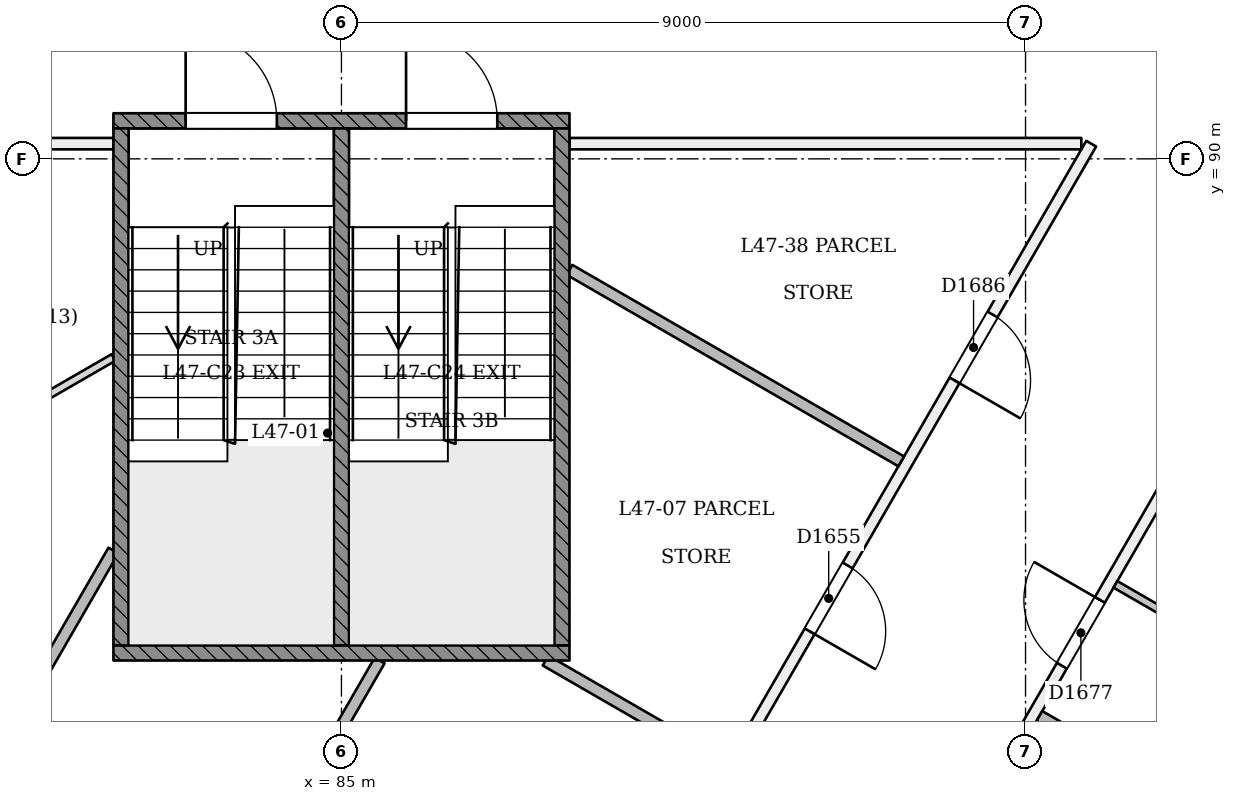
"""IFC4 building model, lengths in metres.
Left out: names, types, materials, properties, quantities, classifications, styles, units other than length and angle.
Written with IfcOpenShell. Run it as: python <this file> out.ifc"""

import sys

from ifc_helpers import new_model, si_unit, direction, frame, frame_2d, origin, place, context, subcontext, project, spatial, rectangle, extrude, element, fill, save


model = new_model("IFC4")
c1 = context("Model", 3, precision=1e-05, world=origin(), true_north=direction((0.0, 1.0)))
c2 = subcontext(c1, "Body", "Model", "MODEL_VIEW")
j1 = project(units=[si_unit("LENGTHUNIT", "METRE"), si_unit("PLANEANGLEUNIT", "RADIAN")], contexts=[c1])
p1 = place(None, origin())
s1 = spatial("IfcSite", under=j1, at=p1, CompositionType="ELEMENT")
p2 = place(p1, origin())
s2 = spatial("IfcBuilding", under=s1, at=p2, CompositionType="ELEMENT")
p3 = place(p2, frame((0.0, 0.0, 181.8)))
s3 = spatial("IfcBuildingStorey", under=s2, at=p3, CompositionType="ELEMENT", Elevation=181.8)
p4 = place(p3, frame((85.0, 73.115, 0.0), z_axis=(0.0, 0.0, 1.0), x_axis=(-0.500000261386, 0.866025252873, 0.0)))
e1 = element("IfcWall", 1, at=p4, inside=s3, PredefinedType="PARTITIONING", context=c2, shape_type="SweptSolid", body=[
    extrude(rectangle(XDim=19.728, YDim=0.15, at=frame_2d((9.864, 0.0))), origin(), (0.0, 0.0, 1.0), 3.15),
])
p5 = place(p4, frame((16.362, 0.0, 0.0)))
e2 = element("IfcOpeningElement", 2, at=p5, cuts=e1, PredefinedType="OPENING", context=c2, shape_type="SweptSolid", body=[
    extrude(rectangle(XDim=0.9, YDim=2.1, at=frame_2d((0.45, 1.05))), frame((0.0, 0.085, 0.0), z_axis=(0.0, -1.0, 0.0), x_axis=(1.0, 0.0, 0.0)), (0.0, 0.0, 1.0), 0.171),
])
p6 = place(p4, frame((11.847, 0.0, 0.0)))
e3 = element("IfcOpeningElement", 3, at=p6, cuts=e1, PredefinedType="OPENING", context=c2, shape_type="SweptSolid", body=[
    extrude(rectangle(XDim=1.0, YDim=2.1, at=frame_2d((0.5, 1.05))), frame((0.0, 0.085, 0.0), z_axis=(0.0, -1.0, 0.0), x_axis=(1.0, 0.0, 0.0)), (0.0, 0.0, 1.0), 0.171),
])
p7 = place(p4, frame((2.715, 0.0, 0.0)))
e4 = element("IfcOpeningElement", 4, at=p7, cuts=e1, PredefinedType="OPENING", context=c2, shape_type="SweptSolid", body=[
    extrude(rectangle(XDim=1.0, YDim=2.1, at=frame_2d((0.5, 1.05))), frame((0.0, 0.085, 0.0), z_axis=(0.0, -1.0, 0.0), x_axis=(1.0, 0.0, 0.0)), (0.0, 0.0, 1.0), 0.171),
])
p8 = place(p4, frame((7.991, 0.0, 0.0)))
e5 = element("IfcOpeningElement", 5, at=p8, cuts=e1, PredefinedType="OPENING", context=c2, shape_type="SweptSolid", body=[
    extrude(rectangle(XDim=1.0, YDim=2.1, at=frame_2d((0.5, 1.05))), frame((0.0, 0.085, 0.0), z_axis=(0.0, -1.0, 0.0), x_axis=(1.0, 0.0, 0.0)), (0.0, 0.0, 1.0), 0.171),
])
p9 = place(p3, frame((75.266, 90.2, 0.0), z_axis=(0.0, 0.0, 1.0), x_axis=(1.0, 0.0, 0.0)))
e6 = element("IfcWall", 6, at=p9, inside=s3, PredefinedType="PARTITIONING", context=c2, shape_type="SweptSolid", body=[
    extrude(rectangle(XDim=6.734, YDim=0.15, at=frame_2d((3.367, 0.0))), origin(), (0.0, 0.0, 1.0), 3.15),
])
p10 = place(p9, frame((4.62, 0.0, 0.0)))
e7 = element("IfcOpeningElement", 7, at=p10, cuts=e6, PredefinedType="OPENING", context=c2, shape_type="SweptSolid", body=[
    extrude(rectangle(XDim=0.9, YDim=2.1, at=frame_2d((0.45, 1.05))), frame((0.0, 0.085, 0.0), z_axis=(0.0, -1.0, 0.0), x_axis=(1.0, 0.0, 0.0)), (0.0, 0.0, 1.0), 0.171),
])
p11 = place(p3, frame((71.556, 90.2, 0.0), z_axis=(0.0, 0.0, 1.0), x_axis=(0.499999195485, -0.866025868271, 0.0)))
e8 = element("IfcWall", 8, at=p11, inside=s3, PredefinedType="PARTITIONING", context=c2, shape_type="SweptSolid", body=[
    extrude(rectangle(XDim=26.651, YDim=0.15, at=frame_2d((13.326, 0.0))), origin(), (0.0, 0.0, 1.0), 2.75),
])
p12 = place(p11, frame((0.381, 0.0, 0.0)))
e9 = element("IfcOpeningElement", 9, at=p12, cuts=e8, PredefinedType="OPENING", context=c2, shape_type="SweptSolid", body=[
    extrude(rectangle(XDim=1.0, YDim=2.1, at=frame_2d((0.5, 1.05))), frame((0.0, 0.085, 0.0), z_axis=(0.0, -1.0, 0.0), x_axis=(1.0, 0.0, 0.0)), (0.0, 0.0, 1.0), 0.171),
])
p13 = place(p11, frame((7.047, 0.0, 0.0)))
e10 = element("IfcOpeningElement", 10, at=p13, cuts=e8, PredefinedType="OPENING", context=c2, shape_type="SweptSolid", body=[
    extrude(rectangle(XDim=1.0, YDim=2.1, at=frame_2d((0.5, 1.05))), frame((0.0, 0.085, 0.0), z_axis=(0.0, -1.0, 0.0), x_axis=(1.0, 0.0, 0.0)), (0.0, 0.0, 1.0), 0.171),
])
p14 = place(p11, frame((10.402, 0.0, 0.0)))
e11 = element("IfcOpeningElement", 11, at=p14, cuts=e8, PredefinedType="OPENING", context=c2, shape_type="SweptSolid", body=[
    extrude(rectangle(XDim=1.0, YDim=2.1, at=frame_2d((0.5, 1.05))), frame((0.0, 0.085, 0.0), z_axis=(0.0, -1.0, 0.0), x_axis=(1.0, 0.0, 0.0)), (0.0, 0.0, 1.0), 0.171),
])
p15 = place(p11, frame((14.902, 0.0, 0.0)))
e12 = element("IfcOpeningElement", 12, at=p15, cuts=e8, PredefinedType="OPENING", context=c2, shape_type="SweptSolid", body=[
    extrude(rectangle(XDim=1.0, YDim=2.1, at=frame_2d((0.5, 1.05))), frame((0.0, 0.085, 0.0), z_axis=(0.0, -1.0, 0.0), x_axis=(1.0, 0.0, 0.0)), (0.0, 0.0, 1.0), 0.171),
])
p16 = place(p11, frame((18.372, 0.0, 0.0)))
e13 = element("IfcOpeningElement", 13, at=p16, cuts=e8, PredefinedType="OPENING", context=c2, shape_type="SweptSolid", body=[
    extrude(rectangle(XDim=1.0, YDim=2.1, at=frame_2d((0.5, 1.05))), frame((0.0, 0.085, 0.0), z_axis=(0.0, -1.0, 0.0), x_axis=(1.0, 0.0, 0.0)), (0.0, 0.0, 1.0), 0.171),
])
p17 = place(p11, frame((24.933, 0.0, 0.0)))
e14 = element("IfcOpeningElement", 14, at=p17, cuts=e8, PredefinedType="OPENING", context=c2, shape_type="SweptSolid", body=[
    extrude(rectangle(XDim=1.0, YDim=2.1, at=frame_2d((0.5, 1.05))), frame((0.0, 0.085, 0.0), z_axis=(0.0, -1.0, 0.0), x_axis=(1.0, 0.0, 0.0)), (0.0, 0.0, 1.0), 0.171),
])
p18 = place(p3, frame((85.033, 66.972, 0.0), z_axis=(0.0, 0.0, 1.0), x_axis=(0.500001115073, 0.866024759996, 0.0)))
e15 = element("IfcWall", 15, at=p18, inside=s3, PredefinedType="PARTITIONING", context=c2, shape_type="SweptSolid", body=[
    extrude(rectangle(XDim=26.822, YDim=0.15, at=frame_2d((13.411, 0.0))), origin(), (0.0, 0.0, 1.0), 2.75),
])
p19 = place(p18, frame((0.527, 0.0, 0.0)))
e16 = element("IfcOpeningElement", 16, at=p19, cuts=e15, PredefinedType="OPENING", context=c2, shape_type="SweptSolid", body=[
    extrude(rectangle(XDim=1.2, YDim=2.1, at=frame_2d((0.6, 1.05))), frame((0.0, 0.085, 0.0), z_axis=(0.0, -1.0, 0.0), x_axis=(1.0, 0.0, 0.0)), (0.0, 0.0, 1.0), 0.171),
])
p20 = place(p18, frame((7.566, 0.0, 0.0)))
e17 = element("IfcOpeningElement", 17, at=p20, cuts=e15, PredefinedType="OPENING", context=c2, shape_type="SweptSolid", body=[
    extrude(rectangle(XDim=1.0, YDim=2.1, at=frame_2d((0.5, 1.05))), frame((0.0, 0.085, 0.0), z_axis=(0.0, -1.0, 0.0), x_axis=(1.0, 0.0, 0.0)), (0.0, 0.0, 1.0), 0.171),
])
p21 = place(p18, frame((9.891, 0.0, 0.0)))
e18 = element("IfcOpeningElement", 18, at=p21, cuts=e15, PredefinedType="OPENING", context=c2, shape_type="SweptSolid", body=[
    extrude(rectangle(XDim=1.0, YDim=2.1, at=frame_2d((0.5, 1.05))), frame((0.0, 0.085, 0.0), z_axis=(0.0, -1.0, 0.0), x_axis=(1.0, 0.0, 0.0)), (0.0, 0.0, 1.0), 0.171),
])
p22 = place(p18, frame((16.45, 0.0, 0.0)))
e19 = element("IfcOpeningElement", 19, at=p22, cuts=e15, PredefinedType="OPENING", context=c2, shape_type="SweptSolid", body=[
    extrude(rectangle(XDim=1.0, YDim=2.1, at=frame_2d((0.5, 1.05))), frame((0.0, 0.085, 0.0), z_axis=(0.0, -1.0, 0.0), x_axis=(1.0, 0.0, 0.0)), (0.0, 0.0, 1.0), 0.171),
])
p23 = place(p18, frame((18.891, 0.0, 0.0)))
e20 = element("IfcOpeningElement", 20, at=p23, cuts=e15, PredefinedType="OPENING", context=c2, shape_type="SweptSolid", body=[
    extrude(rectangle(XDim=1.0, YDim=2.1, at=frame_2d((0.5, 1.05))), frame((0.0, 0.085, 0.0), z_axis=(0.0, -1.0, 0.0), x_axis=(1.0, 0.0, 0.0)), (0.0, 0.0, 1.0), 0.171),
])
p24 = place(p18, frame((24.413, 0.0, 0.0)))
e21 = element("IfcOpeningElement", 21, at=p24, cuts=e15, PredefinedType="OPENING", context=c2, shape_type="SweptSolid", body=[
    extrude(rectangle(XDim=1.0, YDim=2.1, at=frame_2d((0.5, 1.05))), frame((0.0, 0.085, 0.0), z_axis=(0.0, -1.0, 0.0), x_axis=(1.0, 0.0, 0.0)), (0.0, 0.0, 1.0), 0.171),
])
p25 = place(p3, frame((94.864, 90.2, 0.0), z_axis=(0.0, 0.0, 1.0), x_axis=(-0.500001743747, -0.866024397029, 0.0)))
e22 = element("IfcWall", 22, at=p25, inside=s3, PredefinedType="PARTITIONING", context=c2, shape_type="SweptSolid", body=[
    extrude(rectangle(XDim=19.598, YDim=0.15, at=frame_2d((9.799, 0.0))), origin(), (0.0, 0.0, 1.0), 3.15),
])
p26 = place(p25, frame((6.408, 0.0, 0.0)))
e23 = element("IfcOpeningElement", 23, at=p26, cuts=e22, PredefinedType="OPENING", context=c2, shape_type="SweptSolid", body=[
    extrude(rectangle(XDim=1.0, YDim=2.1, at=frame_2d((0.5, 1.05))), frame((0.0, 0.085, 0.0), z_axis=(0.0, -1.0, 0.0), x_axis=(1.0, 0.0, 0.0)), (0.0, 0.0, 1.0), 0.171),
])
p27 = place(p25, frame((11.875, 0.0, 0.0)))
e24 = element("IfcOpeningElement", 24, at=p27, cuts=e22, PredefinedType="OPENING", context=c2, shape_type="SweptSolid", body=[
    extrude(rectangle(XDim=1.0, YDim=2.1, at=frame_2d((0.5, 1.05))), frame((0.0, 0.085, 0.0), z_axis=(0.0, -1.0, 0.0), x_axis=(1.0, 0.0, 0.0)), (0.0, 0.0, 1.0), 0.171),
])
p28 = place(p25, frame((2.596, 0.0, 0.0)))
e25 = element("IfcOpeningElement", 25, at=p28, cuts=e22, PredefinedType="OPENING", context=c2, shape_type="SweptSolid", body=[
    extrude(rectangle(XDim=1.0, YDim=2.1, at=frame_2d((0.5, 1.05))), frame((0.0, 0.085, 0.0), z_axis=(0.0, -1.0, 0.0), x_axis=(1.0, 0.0, 0.0)), (0.0, 0.0, 1.0), 0.171),
])
p29 = place(p3, frame((88.0, 90.2, 0.0), z_axis=(0.0, 0.0, 1.0), x_axis=(1.0, 0.0, 0.0)))
e26 = element("IfcWall", 26, at=p29, inside=s3, PredefinedType="PARTITIONING", context=c2, shape_type="SweptSolid", body=[
    extrude(rectangle(XDim=6.734, YDim=0.15, at=frame_2d((3.367, 0.0))), origin(), (0.0, 0.0, 1.0), 3.15),
])
p30 = place(p3, frame((78.135, 85.155, 0.0), z_axis=(0.0, 0.0, 1.0), x_axis=(0.866036176647, 0.49998134039, 0.0)))
e27 = element("IfcWall", 27, at=p30, inside=s3, PredefinedType="PARTITIONING", context=c2, shape_type="SweptSolid", body=[
    extrude(rectangle(XDim=4.463, YDim=0.1, at=frame_2d((2.231, 0.0))), origin(), (0.0, 0.0, 1.0), 3.15),
])
p31 = place(p3, frame((80.178, 81.692, 0.0), z_axis=(0.0, 0.0, 1.0), x_axis=(0.500037576254, 0.866003708037, 0.0)))
e28 = element("IfcWall", 28, at=p31, inside=s3, PredefinedType="PARTITIONING", context=c2, shape_type="SweptSolid", body=[
    extrude(rectangle(XDim=3.644, YDim=0.15, at=frame_2d((1.822, 0.0))), origin(), (0.0, 0.0, 1.0), 3.15),
])
p32 = place(p3, frame((83.288, 79.564, 0.0), z_axis=(0.0, 0.0, 1.0), x_axis=(0.49999285859, 0.86602952684, 0.0)))
e29 = element("IfcWall", 29, at=p32, inside=s3, PredefinedType="PARTITIONING", context=c2, shape_type="SweptSolid", body=[
    extrude(rectangle(XDim=4.429, YDim=0.15, at=frame_2d((2.214, 0.0))), origin(), (0.0, 0.0, 1.0), 3.15),
])
p33 = place(p3, frame((87.685, 83.4, 0.0), z_axis=(0.0, 0.0, 1.0), x_axis=(0.866043267704, -0.499969057507, 0.0)))
e30 = element("IfcWall", 30, at=p33, inside=s3, PredefinedType="PARTITIONING", context=c2, shape_type="SweptSolid", body=[
    extrude(rectangle(XDim=2.742, YDim=0.15, at=frame_2d((1.371, 0.0))), origin(), (0.0, 0.0, 1.0), 3.15),
])
p34 = place(p3, frame((92.364, 86.02, 0.0), z_axis=(0.0, 0.0, 1.0), x_axis=(-0.866040369504, 0.499974077718, 0.0)))
e31 = element("IfcWall", 31, at=p34, inside=s3, PredefinedType="PARTITIONING", context=c2, shape_type="SweptSolid", body=[
    extrude(rectangle(XDim=5.039, YDim=0.15, at=frame_2d((2.52, 0.0))), origin(), (0.0, 0.0, 1.0), 3.15),
])
p35 = place(p3, frame((99.678, 79.497, 0.0), z_axis=(0.0, 0.0, 1.0), x_axis=(-0.866025401434, 0.500000004071, 0.0)))
e32 = element("IfcWall", 32, at=p35, inside=s3, PredefinedType="PARTITIONING", context=c2, shape_type="SweptSolid", body=[
    extrude(rectangle(XDim=6.345, YDim=0.15, at=frame_2d((3.173, 0.0))), origin(), (0.0, 0.0, 1.0), 2.65),
])
p36 = place(p3, frame((97.629, 82.99, 0.0), z_axis=(0.0, 0.0, 1.0), x_axis=(-0.866011447264, 0.500024172624, 0.0)))
e33 = element("IfcWall", 33, at=p36, inside=s3, PredefinedType="PARTITIONING", context=c2, shape_type="SweptSolid", body=[
    extrude(rectangle(XDim=2.825, YDim=0.1, at=frame_2d((1.413, 0.0))), origin(), (0.0, 0.0, 1.0), 3.15),
])
p37 = place(p36, frame((1.0, 0.0, 0.0)))
e34 = element("IfcOpeningElement", 34, at=p37, cuts=e33, PredefinedType="OPENING", context=c2, shape_type="SweptSolid", body=[
    extrude(rectangle(XDim=0.9, YDim=2.1, at=frame_2d((0.45, 1.05))), frame((0.0, 0.061, 0.0), z_axis=(0.0, -1.0, 0.0), x_axis=(1.0, 0.0, 0.0)), (0.0, 0.0, 1.0), 0.121),
])
p38 = place(p3, frame((82.0, 90.5, 0.0), z_axis=(0.0, 0.0, 1.0), x_axis=(1.0, 0.0, 0.0)))
e35 = element("IfcWall", 35, at=p38, inside=s3, PredefinedType="SOLIDWALL", context=c2, shape_type="SweptSolid", body=[
    extrude(rectangle(XDim=6.0, YDim=0.2, at=frame_2d((3.0, 0.0))), origin(), (0.0, 0.0, 1.0), 3.15),
])
p39 = place(p38, frame((0.95, 0.0, 0.0)))
e36 = element("IfcOpeningElement", 36, at=p39, cuts=e35, PredefinedType="OPENING", context=c2, shape_type="SweptSolid", body=[
    extrude(rectangle(XDim=1.2, YDim=2.1, at=frame_2d((0.6, 1.05))), frame((0.0, 0.11, 0.0), z_axis=(0.0, -1.0, 0.0), x_axis=(1.0, 0.0, 0.0)), (0.0, 0.0, 1.0), 0.221),
])
p40 = place(p38, frame((3.85, 0.0, 0.0)))
e37 = element("IfcOpeningElement", 37, at=p40, cuts=e35, PredefinedType="OPENING", context=c2, shape_type="SweptSolid", body=[
    extrude(rectangle(XDim=1.2, YDim=2.1, at=frame_2d((0.6, 1.05))), frame((0.0, 0.11, 0.0), z_axis=(0.0, -1.0, 0.0), x_axis=(1.0, 0.0, 0.0)), (0.0, 0.0, 1.0), 0.221),
])
p41 = place(p3, frame((82.0, 83.5, 0.0), z_axis=(0.0, 0.0, 1.0), x_axis=(1.0, 0.0, 0.0)))
e38 = element("IfcWall", 38, at=p41, inside=s3, PredefinedType="SOLIDWALL", context=c2, shape_type="SweptSolid", body=[
    extrude(rectangle(XDim=6.0, YDim=0.2, at=frame_2d((3.0, 0.0))), origin(), (0.0, 0.0, 1.0), 3.15),
])
for number, where, z_axis, x_axis in (
    (39, (82.1, 83.6, 0.0), (0.0, 0.0, 1.0), (0.0, 1.0, 0.0)),
    (40, (87.9, 83.6, 0.0), (0.0, 0.0, 1.0), (0.0, 1.0, 0.0)),
    (41, (85.0, 83.6, 0.0), (0.0, 0.0, 1.0), (0.0, 1.0, 0.0)),
):
    element("IfcWall", number, at=place(p3, frame(where, z_axis=z_axis, x_axis=x_axis)), inside=s3, PredefinedType="SOLIDWALL", context=c2, shape_type="SweptSolid", body=[
        extrude(rectangle(XDim=6.8, YDim=0.2, at=frame_2d((3.4, 0.0))), origin(), (0.0, 0.0, 1.0), 3.15),
    ])
p42 = place(p26, origin())
e42 = element("IfcDoor", 42, at=p42, inside=s3, OperationType="SINGLE_SWING_RIGHT", PredefinedType="NOTDEFINED", context=c2, shape_type="SweptSolid", body=[
    extrude(rectangle(XDim=1.0, YDim=2.1, at=frame_2d((0.5, 1.05))), frame((0.0, 0.025, 0.0), z_axis=(0.0, -1.0, 0.0), x_axis=(1.0, 0.0, 0.0)), (0.0, 0.0, 1.0), 0.05),
])
fill(e23, e42)
p43 = place(p23, origin())
e43 = element("IfcDoor", 43, at=p43, inside=s3, OperationType="SINGLE_SWING_RIGHT", PredefinedType="NOTDEFINED", context=c2, shape_type="SweptSolid", body=[
    extrude(rectangle(XDim=1.0, YDim=2.1, at=frame_2d((0.5, 1.05))), frame((0.0, 0.025, 0.0), z_axis=(0.0, -1.0, 0.0), x_axis=(1.0, 0.0, 0.0)), (0.0, 0.0, 1.0), 0.05),
])
fill(e20, e43)
p44 = place(p28, origin())
e44 = element("IfcDoor", 44, at=p44, inside=s3, OperationType="SINGLE_SWING_RIGHT", PredefinedType="NOTDEFINED", context=c2, shape_type="SweptSolid", body=[
    extrude(rectangle(XDim=1.0, YDim=2.1, at=frame_2d((0.5, 1.05))), frame((0.0, 0.025, 0.0), z_axis=(0.0, -1.0, 0.0), x_axis=(1.0, 0.0, 0.0)), (0.0, 0.0, 1.0), 0.05),
])
fill(e25, e44)
p45 = place(p39, origin())
e45 = element("IfcDoor", 45, at=p45, inside=s3, OperationType="SINGLE_SWING_LEFT", PredefinedType="NOTDEFINED", context=c2, shape_type="SweptSolid", body=[
    extrude(rectangle(XDim=1.2, YDim=2.1, at=frame_2d((0.6, 1.05))), frame((0.0, 0.025, 0.0), z_axis=(0.0, -1.0, 0.0), x_axis=(1.0, 0.0, 0.0)), (0.0, 0.0, 1.0), 0.05),
])
fill(e36, e45)
p46 = place(p40, origin())
e46 = element("IfcDoor", 46, at=p46, inside=s3, OperationType="SINGLE_SWING_LEFT", PredefinedType="NOTDEFINED", context=c2, shape_type="SweptSolid", body=[
    extrude(rectangle(XDim=1.2, YDim=2.1, at=frame_2d((0.6, 1.05))), frame((0.0, 0.025, 0.0), z_axis=(0.0, -1.0, 0.0), x_axis=(1.0, 0.0, 0.0)), (0.0, 0.0, 1.0), 0.05),
])
fill(e37, e46)
save(model, sys.argv[1])
